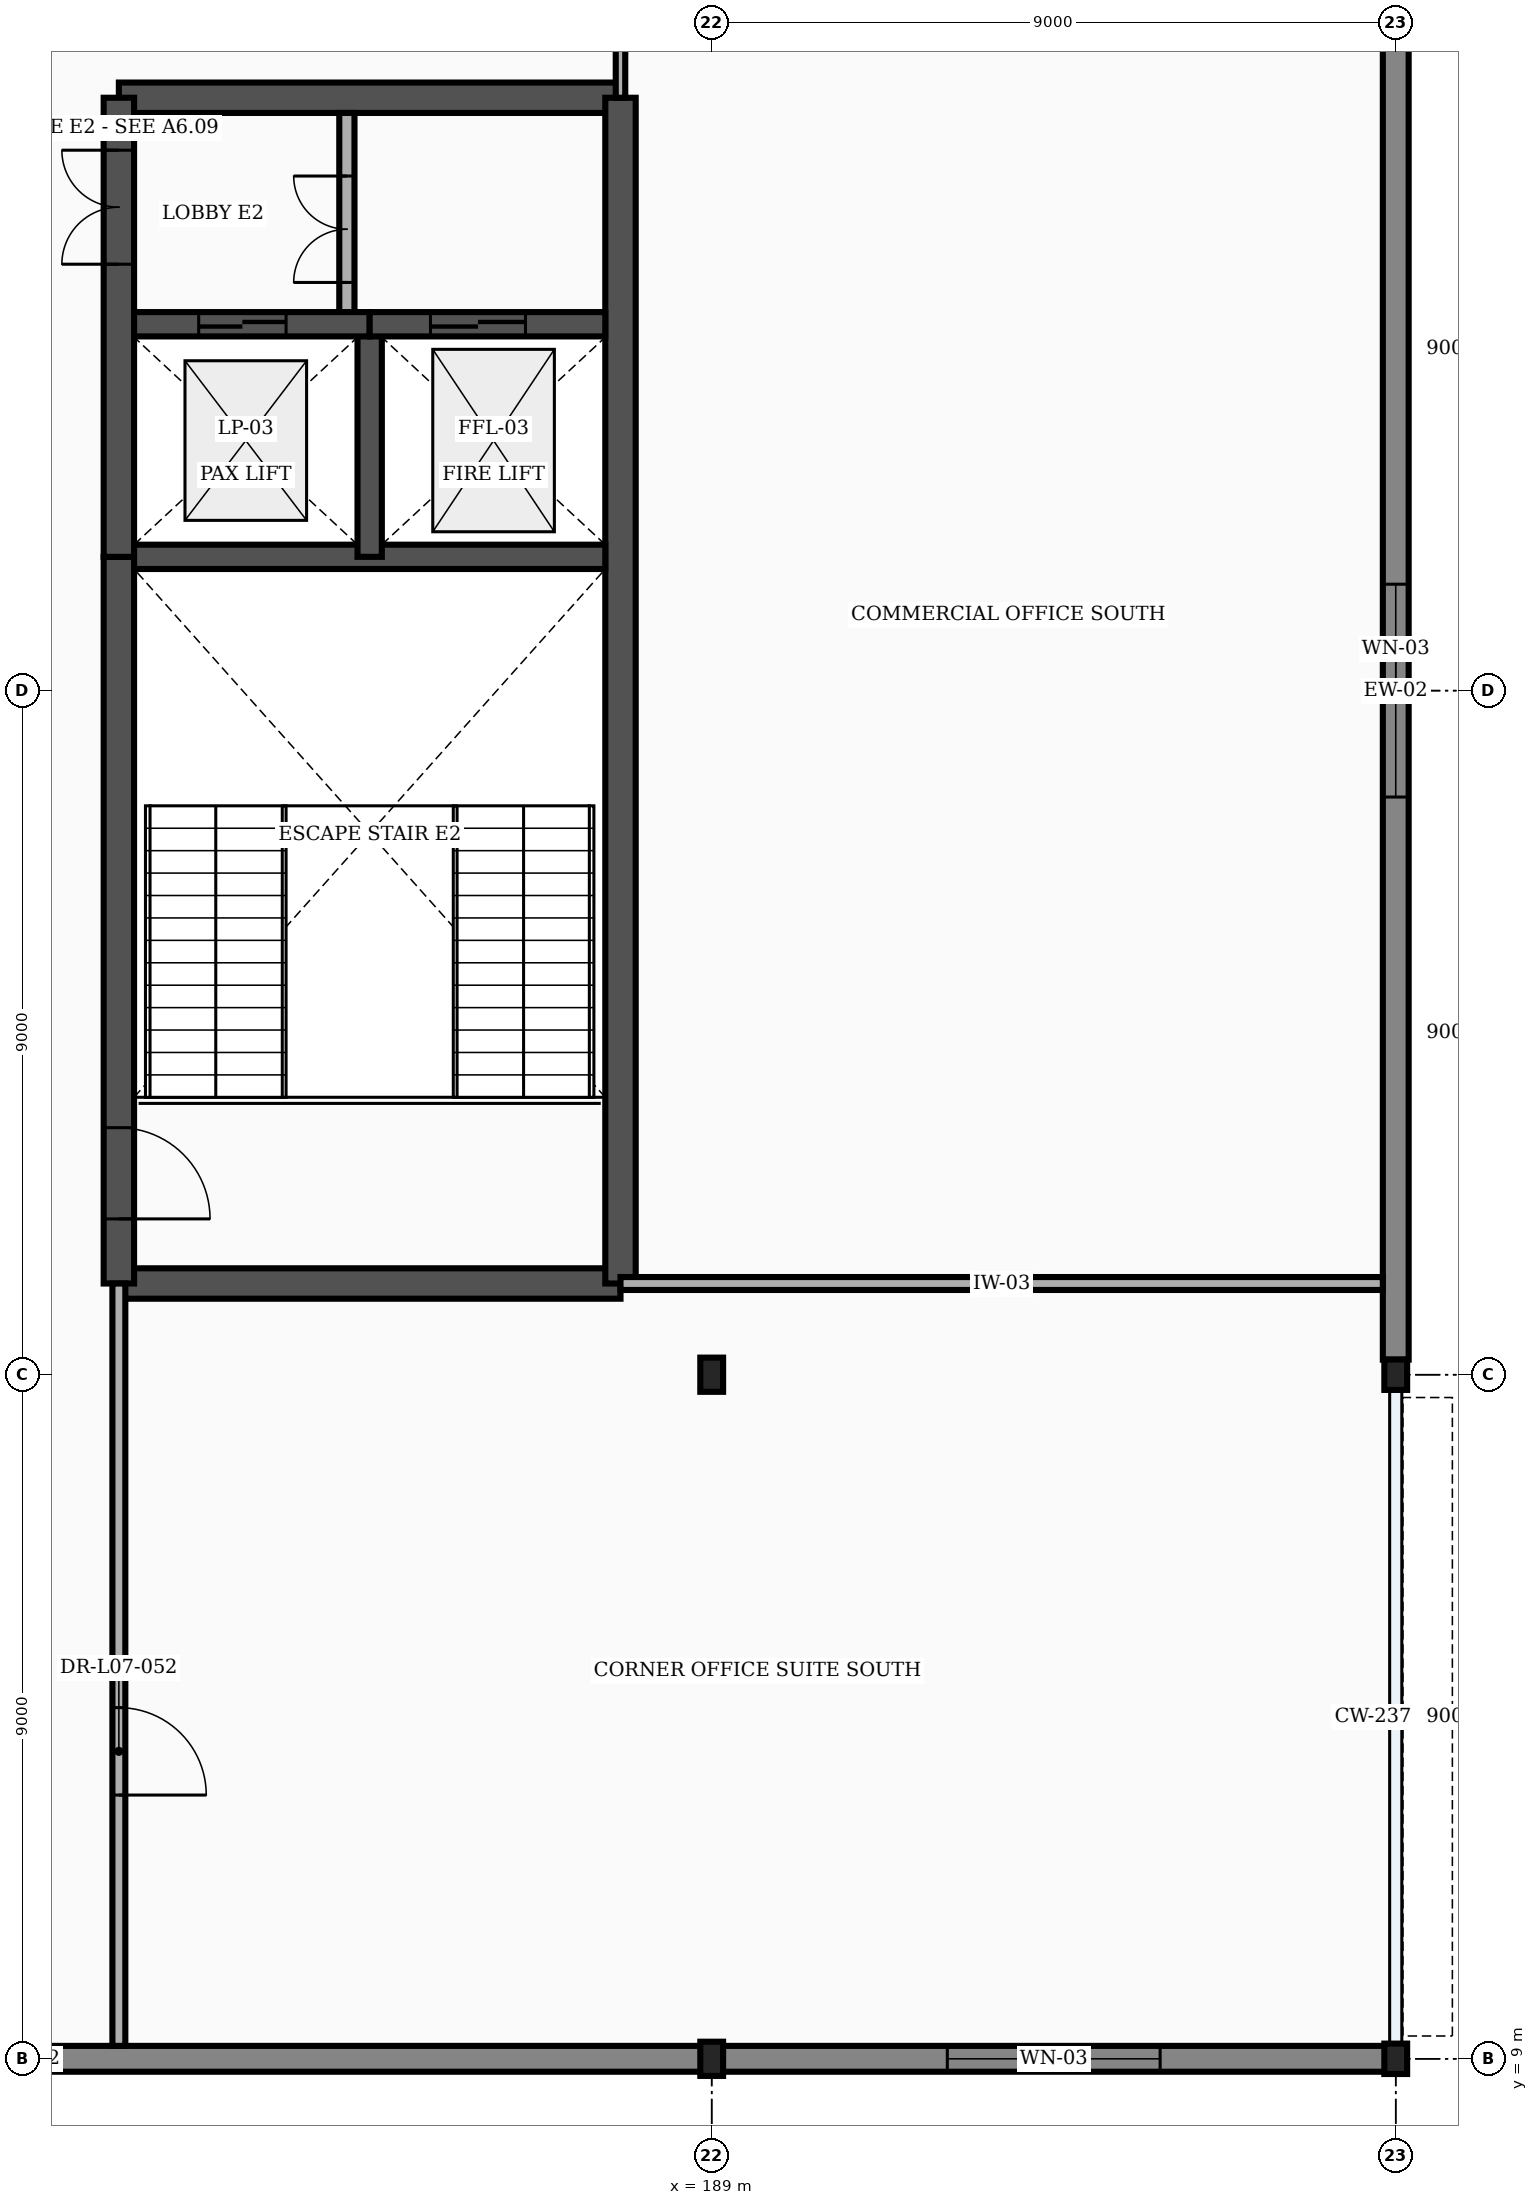
"""IFC4 building model, lengths in metres.
Left out: names, types, materials, properties, quantities, classifications, styles, units other than length and angle.
Written with IfcOpenShell. Run it as: python <this file> out.ifc"""

import sys

from ifc_helpers import new_model, si_unit, direction, frame, frame_2d, origin, origin_2d, place, context, subcontext, project, spatial, rectangle, i_section, extrude, element, fill, save


model = new_model("IFC4")
c1 = context("Model", 3, precision=1e-05, world=origin(), true_north=direction((0.0, 1.0)))
c2 = subcontext(c1, "Body", "Model", "MODEL_VIEW")
j1 = project(units=[si_unit("LENGTHUNIT", "METRE"), si_unit("PLANEANGLEUNIT", "RADIAN")], contexts=[c1])
p1 = place(None, origin())
s1 = spatial("IfcSite", under=j1, at=p1, CompositionType="ELEMENT")
p2 = place(p1, origin())
s2 = spatial("IfcBuilding", under=s1, at=p2, CompositionType="ELEMENT")
p3 = place(p2, frame((0.0, 0.0, 33.3)))
s3 = spatial("IfcBuildingStorey", under=s2, at=p3, CompositionType="ELEMENT", Elevation=33.3)
for number, where, z_axis, x_axis in (
    (1, (189.0, 9.0, 0.0), (0.0, 0.0, 1.0), (1.0, 0.0, 0.0)),
    (2, (189.0, 18.0, 0.0), (0.0, 0.0, 1.0), (1.0, 0.0, 0.0)),
):
    element("IfcColumn", number, at=place(p3, frame(where, z_axis=z_axis, x_axis=x_axis)), inside=s3, PredefinedType="COLUMN", context=c2, shape_type="SweptSolid", body=[
        extrude(i_section(OverallWidth=0.3, OverallDepth=0.45, WebThickness=0.014, FlangeThickness=0.026, FilletRadius=0.027, at=origin_2d()), origin(), (0.0, 0.0, 1.0), 4.5),
    ])
for number, where, z_axis, x_axis in (
    (3, (198.0, 9.0, 0.0), (0.0, 0.0, 1.0), (1.0, 0.0, 0.0)),
    (4, (198.0, 18.0, 0.0), (0.0, 0.0, 1.0), (1.0, 0.0, 0.0)),
):
    element("IfcColumn", number, at=place(p3, frame(where, z_axis=z_axis, x_axis=x_axis)), inside=s3, PredefinedType="COLUMN", context=c2, shape_type="SweptSolid", body=[
        extrude(i_section(OverallWidth=0.3, OverallDepth=0.4, WebThickness=0.013, FlangeThickness=0.024, FilletRadius=0.027, at=origin_2d()), origin(), (0.0, 0.0, 1.0), 4.5),
    ])
p4 = place(p3, frame((171.01, 9.0, 0.0), z_axis=(0.0, 0.0, 1.0), x_axis=(1.0, 0.0, 0.0)))
e5 = element("IfcWall", 5, at=p4, inside=s3, PredefinedType="STANDARD", context=c2, shape_type="SweptSolid", body=[
    extrude(rectangle(XDim=17.98, YDim=0.34, at=frame_2d((8.99, 0.0))), origin(), (0.0, 0.0, 1.0), 3.493),
])
p5 = place(p4, frame((0.65, 0.0, 0.85)))
e6 = element("IfcOpeningElement", 6, at=p5, cuts=e5, PredefinedType="OPENING", context=c2, shape_type="SweptSolid", body=[
    extrude(rectangle(XDim=2.8, YDim=2.25, at=frame_2d((1.4, 1.125))), frame((0.0, 0.182, 0.0), z_axis=(0.0, -1.0, 0.0), x_axis=(1.0, 0.0, 0.0)), (0.0, 0.0, 1.0), 0.364),
])
p6 = place(p3, frame((189.01, 9.0, 0.0), z_axis=(0.0, 0.0, 1.0), x_axis=(1.0, 0.0, 0.0)))
e7 = element("IfcWall", 7, at=p6, inside=s3, PredefinedType="STANDARD", context=c2, shape_type="SweptSolid", body=[
    extrude(rectangle(XDim=8.98, YDim=0.34, at=frame_2d((4.49, 0.0))), origin(), (0.0, 0.0, 1.0), 4.255),
])
p7 = place(p6, frame((3.09, 0.0, 0.85)))
e8 = element("IfcOpeningElement", 8, at=p7, cuts=e7, PredefinedType="OPENING", context=c2, shape_type="SweptSolid", body=[
    extrude(rectangle(XDim=2.8, YDim=2.25, at=frame_2d((1.4, 1.125))), frame((0.0, 0.182, 0.0), z_axis=(0.0, -1.0, 0.0), x_axis=(1.0, 0.0, 0.0)), (0.0, 0.0, 1.0), 0.364),
])
p8 = place(p3, frame((198.0, 18.198, 0.0), z_axis=(0.0, 0.0, 1.0), x_axis=(0.0, 1.0, 0.0)))
e9 = element("IfcWall", 9, at=p8, inside=s3, PredefinedType="STANDARD", context=c2, shape_type="SweptSolid", body=[
    extrude(rectangle(XDim=17.604, YDim=0.34, at=frame_2d((8.802, 0.0))), origin(), (0.0, 0.0, 1.0), 3.643),
])
p9 = place(p8, frame((7.402, 0.0, 0.85)))
e10 = element("IfcOpeningElement", 10, at=p9, cuts=e9, PredefinedType="OPENING", context=c2, shape_type="SweptSolid", body=[
    extrude(rectangle(XDim=2.8, YDim=2.25, at=frame_2d((1.4, 1.125))), frame((0.0, 0.182, 0.0), z_axis=(0.0, -1.0, 0.0), x_axis=(1.0, 0.0, 0.0)), (0.0, 0.0, 1.0), 0.364),
])
for number, where, z_axis, x_axis in (
    (11, (181.2, 19.2, 0.0), (0.0, 0.0, 1.0), (1.0, 0.0, 0.0)),
    (12, (181.2, 34.8, 0.0), (0.0, 0.0, 1.0), (1.0, 0.0, 0.0)),
):
    element("IfcWall", number, at=place(p3, frame(where, z_axis=z_axis, x_axis=x_axis)), inside=s3, PredefinedType="SHEAR", context=c2, shape_type="SweptSolid", body=[
        extrude(rectangle(XDim=6.6, YDim=0.4, at=frame_2d((3.3, 0.0))), origin(), (0.0, 0.0, 1.0), 4.255),
    ])
p10 = place(p3, frame((187.8, 19.2, 0.0), z_axis=(0.0, 0.0, 1.0), x_axis=(0.0, 1.0, 0.0)))
e13 = element("IfcWall", 13, at=p10, inside=s3, PredefinedType="SHEAR", context=c2, shape_type="SweptSolid", body=[
    extrude(rectangle(XDim=15.6, YDim=0.4, at=frame_2d((7.8, 0.0))), origin(), (0.0, 0.0, 1.0), 4.255),
])
p11 = place(p3, frame((181.2, 19.2, 0.0), z_axis=(0.0, 0.0, 1.0), x_axis=(0.0, 1.0, 0.0)))
e14 = element("IfcWall", 14, at=p11, inside=s3, PredefinedType="SHEAR", context=c2, shape_type="SweptSolid", body=[
    extrude(rectangle(XDim=9.56, YDim=0.4, at=frame_2d((4.78, 0.0))), origin(), (0.0, 0.0, 1.0), 4.255),
])
p12 = place(p11, frame((0.85, 0.0, 0.0)))
e15 = element("IfcOpeningElement", 15, at=p12, cuts=e14, PredefinedType="OPENING", context=c2, shape_type="SweptSolid", body=[
    extrude(rectangle(XDim=1.2, YDim=2.2, at=frame_2d((0.6, 1.1))), frame((0.0, 0.212, 0.0), z_axis=(0.0, -1.0, 0.0), x_axis=(1.0, 0.0, 0.0)), (0.0, 0.0, 1.0), 0.424),
])
p13 = place(p3, frame((181.2, 28.76, 0.0), z_axis=(0.0, 0.0, 1.0), x_axis=(0.0, 1.0, 0.0)))
e16 = element("IfcWall", 16, at=p13, inside=s3, PredefinedType="SHEAR", context=c2, shape_type="SweptSolid", body=[
    extrude(rectangle(XDim=6.04, YDim=0.4, at=frame_2d((3.02, 0.0))), origin(), (0.0, 0.0, 1.0), 4.255),
])
p14 = place(p13, frame((3.85, 0.0, 0.0)))
e17 = element("IfcOpeningElement", 17, at=p14, cuts=e16, PredefinedType="OPENING", context=c2, shape_type="SweptSolid", body=[
    extrude(rectangle(XDim=1.5, YDim=2.2, at=frame_2d((0.75, 1.1))), frame((0.0, 0.212, 0.0), z_axis=(0.0, -1.0, 0.0), x_axis=(1.0, 0.0, 0.0)), (0.0, 0.0, 1.0), 0.424),
])
p15 = place(p3, frame((181.4, 28.76, 0.0), z_axis=(0.0, 0.0, 1.0), x_axis=(1.0, 0.0, 0.0)))
e18 = element("IfcWall", 18, at=p15, inside=s3, PredefinedType="SHEAR", context=c2, shape_type="SweptSolid", body=[
    extrude(rectangle(XDim=6.2, YDim=0.32, at=frame_2d((3.1, 0.0))), origin(), (0.0, 0.0, 1.0), 4.255),
])
p16 = place(p3, frame((184.5, 28.76, 0.0), z_axis=(0.0, 0.0, 1.0), x_axis=(0.0, 1.0, 0.0)))
e19 = element("IfcWall", 19, at=p16, inside=s3, PredefinedType="SHEAR", context=c2, shape_type="SweptSolid", body=[
    extrude(rectangle(XDim=3.06, YDim=0.32, at=frame_2d((1.53, 0.0))), origin(), (0.0, 0.0, 1.0), 4.255),
])
p17 = place(p3, frame((184.2, 31.82, 0.0), z_axis=(0.0, 0.0, 1.0), x_axis=(0.0, 1.0, 0.0)))
e20 = element("IfcWall", 20, at=p17, inside=s3, PredefinedType="PARTITIONING", context=c2, shape_type="SweptSolid", body=[
    extrude(rectangle(XDim=2.78, YDim=0.2, at=frame_2d((1.39, 0.0))), origin(), (0.0, 0.0, 1.0), 4.255),
])
p18 = place(p17, frame((0.55, 0.0, 0.0)))
e21 = element("IfcOpeningElement", 21, at=p18, cuts=e20, PredefinedType="OPENING", context=c2, shape_type="SweptSolid", body=[
    extrude(rectangle(XDim=1.4, YDim=2.25, at=frame_2d((0.7, 1.125))), frame((0.0, 0.112, 0.0), z_axis=(0.0, -1.0, 0.0), x_axis=(1.0, 0.0, 0.0)), (0.0, 0.0, 1.0), 0.224),
])
p19 = place(p3, frame((181.4, 31.82, 0.0), z_axis=(0.0, 0.0, 1.0), x_axis=(1.0, 0.0, 0.0)))
e22 = element("IfcWall", 22, at=p19, inside=s3, PredefinedType="SHEAR", context=c2, shape_type="SweptSolid", body=[
    extrude(rectangle(XDim=3.1, YDim=0.32, at=frame_2d((1.55, 0.0))), origin(), (0.0, 0.0, 1.0), 4.255),
])
p20 = place(p19, frame((0.85, 0.0, 0.0)))
e23 = element("IfcOpeningElement", 23, at=p20, cuts=e22, PredefinedType="OPENING", context=c2, shape_type="SweptSolid", body=[
    extrude(rectangle(XDim=1.15, YDim=2.2, at=frame_2d((0.575, 1.1))), frame((0.0, 0.172, 0.0), z_axis=(0.0, -1.0, 0.0), x_axis=(1.0, 0.0, 0.0)), (0.0, 0.0, 1.0), 0.344),
])
p21 = place(p3, frame((184.5, 31.82, 0.0), z_axis=(0.0, 0.0, 1.0), x_axis=(1.0, 0.0, 0.0)))
e24 = element("IfcWall", 24, at=p21, inside=s3, PredefinedType="SHEAR", context=c2, shape_type="SweptSolid", body=[
    extrude(rectangle(XDim=3.1, YDim=0.32, at=frame_2d((1.55, 0.0))), origin(), (0.0, 0.0, 1.0), 4.255),
])
p22 = place(p21, frame((0.8, 0.0, 0.0)))
e25 = element("IfcOpeningElement", 25, at=p22, cuts=e24, PredefinedType="OPENING", context=c2, shape_type="SweptSolid", body=[
    extrude(rectangle(XDim=1.25, YDim=2.25, at=frame_2d((0.625, 1.125))), frame((0.0, 0.172, 0.0), z_axis=(0.0, -1.0, 0.0), x_axis=(1.0, 0.0, 0.0)), (0.0, 0.0, 1.0), 0.344),
])
p23 = place(p3, frame((187.8, 34.8, 0.0), z_axis=(0.0, 0.0, 1.0), x_axis=(0.0, 1.0, 0.0)))
e26 = element("IfcWall", 26, at=p23, inside=s3, PredefinedType="PARTITIONING", context=c2, shape_type="SweptSolid", body=[
    extrude(rectangle(XDim=2.0, YDim=0.125, at=frame_2d((1.0, 0.0))), origin(), (0.0, 0.0, 1.0), 4.255),
])
p24 = place(p3, frame((187.8, 19.2, 0.0), z_axis=(0.0, 0.0, 1.0), x_axis=(1.0, 0.0, 0.0)))
e27 = element("IfcWall", 27, at=p24, inside=s3, PredefinedType="PARTITIONING", context=c2, shape_type="SweptSolid", body=[
    extrude(rectangle(XDim=10.03, YDim=0.17, at=frame_2d((5.015, 0.0))), origin(), (0.0, 0.0, 1.0), 4.255),
])
p25 = place(p3, frame((181.2, 9.17, 0.0), z_axis=(0.0, 0.0, 1.0), x_axis=(0.0, 1.0, 0.0)))
e28 = element("IfcWall", 28, at=p25, inside=s3, PredefinedType="PARTITIONING", context=c2, shape_type="SweptSolid", body=[
    extrude(rectangle(XDim=10.03, YDim=0.17, at=frame_2d((5.015, 0.0))), origin(), (0.0, 0.0, 1.0), 4.255),
])
p26 = place(p25, frame((3.3, 0.0, 0.0)))
e29 = element("IfcOpeningElement", 29, at=p26, cuts=e28, PredefinedType="OPENING", context=c2, shape_type="SweptSolid", body=[
    extrude(rectangle(XDim=1.15, YDim=2.15, at=frame_2d((0.575, 1.075))), frame((0.0, 0.097, 0.0), z_axis=(0.0, -1.0, 0.0), x_axis=(1.0, 0.0, 0.0)), (0.0, 0.0, 1.0), 0.194),
])
p27 = place(p7, origin())
e30 = element("IfcWindow", 30, at=p27, inside=s3, PartitioningType="SINGLE_PANEL", PredefinedType="WINDOW", context=c2, shape_type="SweptSolid", body=[
    extrude(rectangle(XDim=2.8, YDim=2.25, at=frame_2d((1.4, 1.125))), frame((0.0, 0.03, 0.0), z_axis=(0.0, -1.0, 0.0), x_axis=(1.0, 0.0, 0.0)), (0.0, 0.0, 1.0), 0.06),
])
fill(e8, e30)
p28 = place(p9, origin())
e31 = element("IfcWindow", 31, at=p28, inside=s3, PartitioningType="SINGLE_PANEL", PredefinedType="WINDOW", context=c2, shape_type="SweptSolid", body=[
    extrude(rectangle(XDim=2.8, YDim=2.25, at=frame_2d((1.4, 1.125))), frame((0.0, 0.03, 0.0), z_axis=(0.0, -1.0, 0.0), x_axis=(1.0, 0.0, 0.0)), (0.0, 0.0, 1.0), 0.06),
])
fill(e10, e31)
p29 = place(p12, frame((1.2, 0.0, 0.0), z_axis=(0.0, 0.0, 1.0), x_axis=(-1.0, 0.0, 0.0)))
e32 = element("IfcDoor", 32, at=p29, inside=s3, OperationType="SINGLE_SWING_RIGHT", PredefinedType="DOOR", context=c2, shape_type="SweptSolid", body=[
    extrude(rectangle(XDim=1.2, YDim=2.2, at=frame_2d((0.6, 1.1))), frame((0.0, 0.025, 0.0), z_axis=(0.0, -1.0, 0.0), x_axis=(1.0, 0.0, 0.0)), (0.0, 0.0, 1.0), 0.05),
])
fill(e15, e32)
p30 = place(p14, origin())
e33 = element("IfcDoor", 33, at=p30, inside=s3, OperationType="DOUBLE_DOOR_SINGLE_SWING", PredefinedType="DOOR", context=c2, shape_type="SweptSolid", body=[
    extrude(rectangle(XDim=1.5, YDim=2.2, at=frame_2d((0.75, 1.1))), frame((0.0, 0.025, 0.0), z_axis=(0.0, -1.0, 0.0), x_axis=(1.0, 0.0, 0.0)), (0.0, 0.0, 1.0), 0.05),
])
fill(e17, e33)
p31 = place(p18, origin())
e34 = element("IfcDoor", 34, at=p31, inside=s3, OperationType="DOUBLE_DOOR_SINGLE_SWING", PredefinedType="DOOR", context=c2, shape_type="SweptSolid", body=[
    extrude(rectangle(XDim=1.4, YDim=2.25, at=frame_2d((0.7, 1.125))), frame((0.0, 0.025, 0.0), z_axis=(0.0, -1.0, 0.0), x_axis=(1.0, 0.0, 0.0)), (0.0, 0.0, 1.0), 0.05),
])
fill(e21, e34)
p32 = place(p20, origin())
e35 = element("IfcDoor", 35, at=p32, inside=s3, OperationType="DOUBLE_DOOR_SLIDING", PredefinedType="DOOR", context=c2, shape_type="SweptSolid", body=[
    extrude(rectangle(XDim=1.15, YDim=2.2, at=frame_2d((0.575, 1.1))), frame((0.0, 0.025, 0.0), z_axis=(0.0, -1.0, 0.0), x_axis=(1.0, 0.0, 0.0)), (0.0, 0.0, 1.0), 0.05),
])
fill(e23, e35)
p33 = place(p22, origin())
e36 = element("IfcDoor", 36, at=p33, inside=s3, OperationType="DOUBLE_DOOR_SLIDING", PredefinedType="DOOR", context=c2, shape_type="SweptSolid", body=[
    extrude(rectangle(XDim=1.25, YDim=2.25, at=frame_2d((0.625, 1.125))), frame((0.0, 0.025, 0.0), z_axis=(0.0, -1.0, 0.0), x_axis=(1.0, 0.0, 0.0)), (0.0, 0.0, 1.0), 0.05),
])
fill(e25, e36)
p34 = place(p26, frame((1.15, 0.0, 0.0), z_axis=(0.0, 0.0, 1.0), x_axis=(-1.0, 0.0, 0.0)))
e37 = element("IfcDoor", 37, at=p34, inside=s3, OperationType="SINGLE_SWING_RIGHT", PredefinedType="DOOR", context=c2, shape_type="SweptSolid", body=[
    extrude(rectangle(XDim=1.15, YDim=2.15, at=frame_2d((0.575, 1.075))), frame((0.0, 0.025, 0.0), z_axis=(0.0, -1.0, 0.0), x_axis=(1.0, 0.0, 0.0)), (0.0, 0.0, 1.0), 0.05),
])
fill(e29, e37)
save(model, sys.argv[1])
